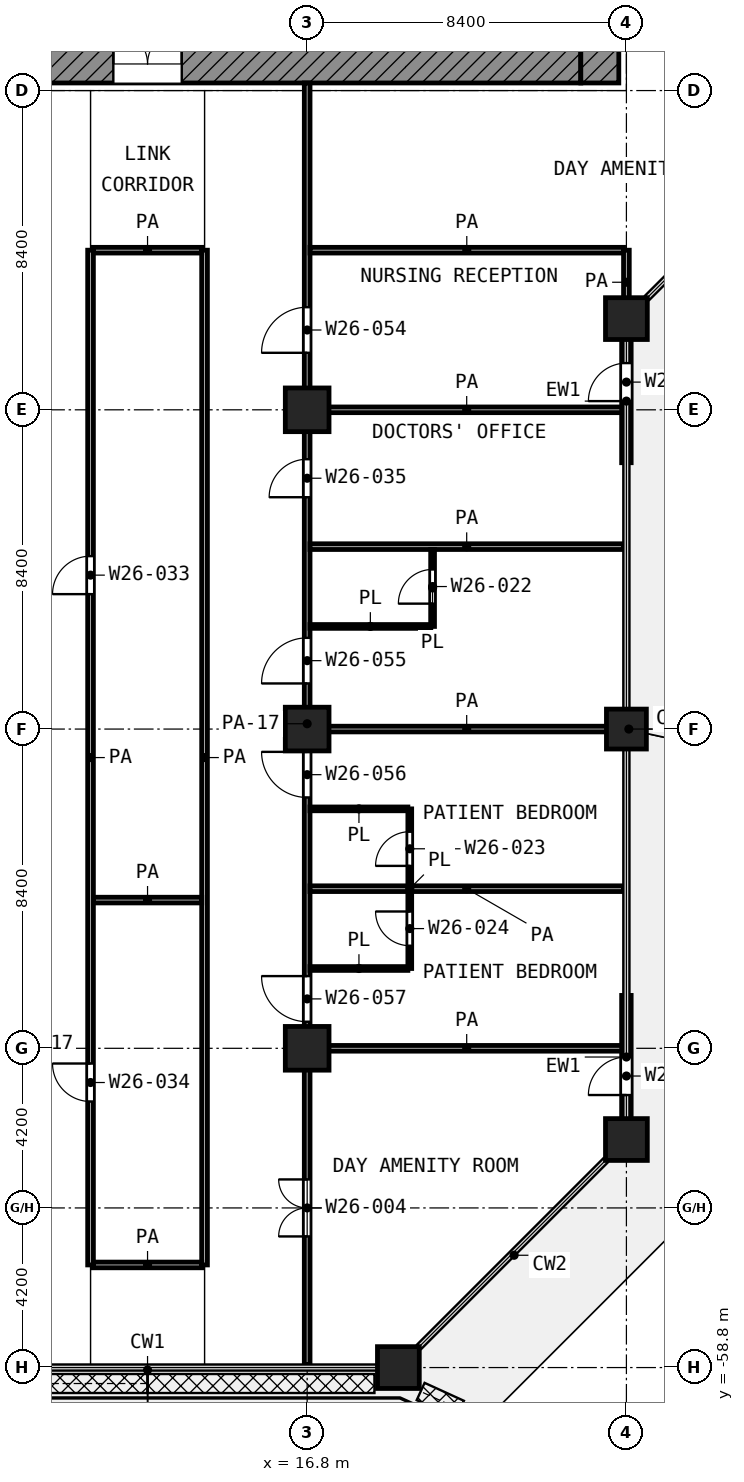
"""IFC4 building model, lengths in metres.
Left out: names, types, materials, properties, quantities, classifications, styles, units other than length and angle.
Written with IfcOpenShell. Run it as: python <this file> out.ifc"""

import sys

from ifc_helpers import new_model, si_unit, direction, frame, frame_2d, origin, origin_2d, place, context, subcontext, project, spatial, rectangle, extrude, element, fill, save


model = new_model("IFC4")
c1 = context("Model", 3, precision=1e-05, world=origin(), true_north=direction((0.0, 1.0)))
c2 = subcontext(c1, "Body", "Model", "MODEL_VIEW")
j1 = project(units=[si_unit("LENGTHUNIT", "METRE"), si_unit("PLANEANGLEUNIT", "RADIAN")], contexts=[c1])
p1 = place(None, origin())
s1 = spatial("IfcSite", under=j1, at=p1, CompositionType="ELEMENT")
p2 = place(p1, origin())
s2 = spatial("IfcBuilding", under=s1, at=p2, CompositionType="ELEMENT")
p3 = place(p2, frame((0.0, 0.0, 115.6)))
s3 = spatial("IfcBuildingStorey", under=s2, at=p3, CompositionType="ELEMENT", Elevation=115.6)
p4 = place(p3, frame((25.2, -31.2, 0.0), z_axis=(0.0, 0.0, 1.0), x_axis=(1.0, 0.0, 0.0)))
e1 = element("IfcColumn", 1, at=p4, inside=s3, PredefinedType="COLUMN", context=c2, shape_type="SweptSolid", body=[
    extrude(rectangle(XDim=1.1, YDim=1.1, at=origin_2d()), origin(), (0.0, 0.0, 1.0), 4.2),
])
for number, where, z_axis, x_axis in (
    (2, (16.8, -33.6, 0.0), (0.0, 0.0, 1.0), (1.0, 0.0, 0.0)),
    (3, (16.8, -42.0, 0.0), (0.0, 0.0, 1.0), (1.0, 0.0, 0.0)),
):
    element("IfcColumn", number, at=place(p3, frame(where, z_axis=z_axis, x_axis=x_axis)), inside=s3, PredefinedType="COLUMN", context=c2, shape_type="SweptSolid", body=[
        extrude(rectangle(XDim=1.15, YDim=1.15, at=origin_2d()), origin(), (0.0, 0.0, 1.0), 4.2),
    ])
p5 = place(p3, frame((25.2, -42.0, 0.0), z_axis=(0.0, 0.0, 1.0), x_axis=(1.0, 0.0, 0.0)))
e4 = element("IfcColumn", 4, at=p5, inside=s3, PredefinedType="COLUMN", context=c2, shape_type="SweptSolid", body=[
    extrude(rectangle(XDim=1.05, YDim=1.05, at=origin_2d()), origin(), (0.0, 0.0, 1.0), 4.2),
])
p6 = place(p3, frame((16.8, -50.4, 0.0), z_axis=(0.0, 0.0, 1.0), x_axis=(1.0, 0.0, 0.0)))
e5 = element("IfcColumn", 5, at=p6, inside=s3, PredefinedType="COLUMN", context=c2, shape_type="SweptSolid", body=[
    extrude(rectangle(XDim=1.15, YDim=1.15, at=origin_2d()), origin(), (0.0, 0.0, 1.0), 4.2),
])
for number, where, z_axis, x_axis in (
    (6, (25.2, -52.8, 0.0), (0.0, 0.0, 1.0), (1.0, 0.0, 0.0)),
    (7, (19.2, -58.8, 0.0), (0.0, 0.0, 1.0), (1.0, 0.0, 0.0)),
):
    element("IfcColumn", number, at=place(p3, frame(where, z_axis=z_axis, x_axis=x_axis)), inside=s3, PredefinedType="COLUMN", context=c2, shape_type="SweptSolid", body=[
        extrude(rectangle(XDim=1.1, YDim=1.1, at=origin_2d()), origin(), (0.0, 0.0, 1.0), 4.2),
    ])
p7 = place(p3, frame((25.2, -52.25, 0.0), z_axis=(0.0, 0.0, 1.0), x_axis=(0.0, 1.0, 0.0)))
e8 = element("IfcWall", 8, at=p7, inside=s3, PredefinedType="SOLIDWALL", context=c2, shape_type="SweptSolid", body=[
    extrude(rectangle(XDim=3.242, YDim=0.25, at=frame_2d((1.621, 0.0))), origin(), (0.0, 0.0, 1.0), 3.48),
])
p8 = place(p7, frame((0.621, 0.0, 0.0)))
e9 = element("IfcOpeningElement", 9, at=p8, cuts=e8, PredefinedType="OPENING", context=c2, shape_type="SweptSolid", body=[
    extrude(rectangle(XDim=1.0, YDim=2.1, at=frame_2d((0.5, 1.05))), frame((0.0, 0.135, 0.0), z_axis=(0.0, -1.0, 0.0), x_axis=(1.0, 0.0, 0.0)), (0.0, 0.0, 1.0), 0.27),
])
p9 = place(p3, frame((25.2, -34.992, 0.0), z_axis=(0.0, 0.0, 1.0), x_axis=(0.0, 1.0, 0.0)))
e10 = element("IfcWall", 10, at=p9, inside=s3, PredefinedType="SOLIDWALL", context=c2, shape_type="SweptSolid", body=[
    extrude(rectangle(XDim=3.242, YDim=0.25, at=frame_2d((1.621, 0.0))), origin(), (0.0, 0.0, 1.0), 3.48),
])
p10 = place(p9, frame((1.621, 0.0, 0.0)))
e11 = element("IfcOpeningElement", 11, at=p10, cuts=e10, PredefinedType="OPENING", context=c2, shape_type="SweptSolid", body=[
    extrude(rectangle(XDim=1.0, YDim=2.1, at=frame_2d((0.5, 1.05))), frame((0.0, 0.135, 0.0), z_axis=(0.0, -1.0, 0.0), x_axis=(1.0, 0.0, 0.0)), (0.0, 0.0, 1.0), 0.27),
])
p11 = place(p3, frame((5.4, -24.5, 0.0), z_axis=(0.0, 0.0, 1.0), x_axis=(1.0, 0.0, 0.0)))
e12 = element("IfcWall", 12, at=p11, inside=s3, PredefinedType="SHEAR", context=c2, shape_type="SweptSolid", body=[
    extrude(rectangle(XDim=18.6, YDim=1.0, at=frame_2d((9.3, 0.0))), origin(), (0.0, 0.0, 1.0), 3.6),
])
p12 = place(p11, frame((6.3, 0.0, 0.0)))
e13 = element("IfcOpeningElement", 13, at=p12, cuts=e12, PredefinedType="OPENING", context=c2, shape_type="SweptSolid", body=[
    extrude(rectangle(XDim=1.8, YDim=2.1, at=frame_2d((0.9, 1.05))), frame((0.0, 0.51, 0.0), z_axis=(0.0, -1.0, 0.0), x_axis=(1.0, 0.0, 0.0)), (0.0, 0.0, 1.0), 1.02),
])
p13 = place(p3, frame((24.5, -25.0, 0.0), z_axis=(0.0, 0.0, 1.0), x_axis=(0.0, 1.0, 0.0)))
e14 = element("IfcWall", 14, at=p13, inside=s3, PredefinedType="SHEAR", context=c2, shape_type="SweptSolid", body=[
    extrude(rectangle(XDim=1.0, YDim=1.0, at=frame_2d((0.5, 0.0))), origin(), (0.0, 0.0, 1.0), 3.6),
])
for number, where, z_axis, x_axis in (
    (15, (16.875, -48.3, 0.0), (0.0, 0.0, 1.0), (1.0, 0.0, 0.0)),
    (16, (16.875, -44.1, 0.0), (0.0, 0.0, 1.0), (1.0, 0.0, 0.0)),
):
    element("IfcWall", number, at=place(p3, frame(where, z_axis=z_axis, x_axis=x_axis)), inside=s3, PredefinedType="PARTITIONING", context=c2, shape_type="SweptSolid", body=[
        extrude(rectangle(XDim=2.575, YDim=0.1, at=frame_2d((1.288, 0.0))), origin(), (0.0, 0.0, 1.0), 3.6),
    ])
p14 = place(p3, frame((16.875, -39.3, 0.0), z_axis=(0.0, 0.0, 1.0), x_axis=(1.0, 0.0, 0.0)))
e17 = element("IfcWall", 17, at=p14, inside=s3, PredefinedType="PARTITIONING", context=c2, shape_type="SweptSolid", body=[
    extrude(rectangle(XDim=3.175, YDim=0.1, at=frame_2d((1.587, 0.0))), origin(), (0.0, 0.0, 1.0), 3.6),
])
p15 = place(p3, frame((19.5, -48.3, 0.0), z_axis=(0.0, 0.0, 1.0), x_axis=(0.0, 1.0, 0.0)))
e18 = element("IfcWall", 18, at=p15, inside=s3, PredefinedType="PARTITIONING", context=c2, shape_type="SweptSolid", body=[
    extrude(rectangle(XDim=4.2, YDim=0.1, at=frame_2d((2.1, 0.0))), origin(), (0.0, 0.0, 1.0), 3.6),
])
p16 = place(p15, frame((2.7, 0.0, 0.0)))
e19 = element("IfcOpeningElement", 19, at=p16, cuts=e18, PredefinedType="OPENING", context=c2, shape_type="SweptSolid", body=[
    extrude(rectangle(XDim=0.9, YDim=2.1, at=frame_2d((0.45, 1.05))), frame((0.0, 0.06, 0.0), z_axis=(0.0, -1.0, 0.0), x_axis=(1.0, 0.0, 0.0)), (0.0, 0.0, 1.0), 0.12),
])
p17 = place(p15, frame((0.6, 0.0, 0.0)))
e20 = element("IfcOpeningElement", 20, at=p17, cuts=e18, PredefinedType="OPENING", context=c2, shape_type="SweptSolid", body=[
    extrude(rectangle(XDim=0.9, YDim=2.1, at=frame_2d((0.45, 1.05))), frame((0.0, 0.06, 0.0), z_axis=(0.0, -1.0, 0.0), x_axis=(1.0, 0.0, 0.0)), (0.0, 0.0, 1.0), 0.12),
])
p18 = place(p3, frame((20.1, -39.3, 0.0), z_axis=(0.0, 0.0, 1.0), x_axis=(0.0, 1.0, 0.0)))
e21 = element("IfcWall", 21, at=p18, inside=s3, PredefinedType="PARTITIONING", context=c2, shape_type="SweptSolid", body=[
    extrude(rectangle(XDim=2.025, YDim=0.1, at=frame_2d((1.013, 0.0))), origin(), (0.0, 0.0, 1.0), 3.6),
])
p19 = place(p18, frame((0.6, 0.0, 0.0)))
e22 = element("IfcOpeningElement", 22, at=p19, cuts=e21, PredefinedType="OPENING", context=c2, shape_type="SweptSolid", body=[
    extrude(rectangle(XDim=0.9, YDim=2.1, at=frame_2d((0.45, 1.05))), frame((0.0, 0.06, 0.0), z_axis=(0.0, -1.0, 0.0), x_axis=(1.0, 0.0, 0.0)), (0.0, 0.0, 1.0), 0.12),
])
p20 = place(p3, frame((11.175, -56.1, 0.0), z_axis=(0.0, 0.0, 1.0), x_axis=(1.0, 0.0, 0.0)))
e23 = element("IfcWall", 23, at=p20, inside=s3, PredefinedType="PARTITIONING", context=c2, shape_type="SweptSolid", body=[
    extrude(rectangle(XDim=2.85, YDim=0.15, at=frame_2d((1.425, 0.0))), origin(), (0.0, 0.0, 1.0), 3.6),
])
p21 = place(p3, frame((16.875, -50.4, 0.0), z_axis=(0.0, 0.0, 1.0), x_axis=(1.0, 0.0, 0.0)))
e24 = element("IfcWall", 24, at=p21, inside=s3, PredefinedType="PARTITIONING", context=c2, shape_type="SweptSolid", body=[
    extrude(rectangle(XDim=8.245, YDim=0.15, at=frame_2d((4.123, 0.0))), origin(), (0.0, 0.0, 1.0), 3.6),
])
p22 = place(p3, frame((11.175, -46.5, 0.0), z_axis=(0.0, 0.0, 1.0), x_axis=(1.0, 0.0, 0.0)))
e25 = element("IfcWall", 25, at=p22, inside=s3, PredefinedType="PARTITIONING", context=c2, shape_type="SweptSolid", body=[
    extrude(rectangle(XDim=2.85, YDim=0.15, at=frame_2d((1.425, 0.0))), origin(), (0.0, 0.0, 1.0), 3.6),
])
for number, where, z_axis, x_axis in (
    (26, (16.875, -46.2, 0.0), (0.0, 0.0, 1.0), (1.0, 0.0, 0.0)),
    (27, (16.875, -42.0, 0.0), (0.0, 0.0, 1.0), (1.0, 0.0, 0.0)),
    (28, (16.875, -37.2, 0.0), (0.0, 0.0, 1.0), (1.0, 0.0, 0.0)),
    (29, (16.875, -33.6, 0.0), (0.0, 0.0, 1.0), (1.0, 0.0, 0.0)),
):
    element("IfcWall", number, at=place(p3, frame(where, z_axis=z_axis, x_axis=x_axis)), inside=s3, PredefinedType="PARTITIONING", context=c2, shape_type="SweptSolid", body=[
        extrude(rectangle(XDim=8.245, YDim=0.15, at=frame_2d((4.123, 0.0))), origin(), (0.0, 0.0, 1.0), 3.6),
    ])
p23 = place(p3, frame((11.175, -29.4, 0.0), z_axis=(0.0, 0.0, 1.0), x_axis=(1.0, 0.0, 0.0)))
e30 = element("IfcWall", 30, at=p23, inside=s3, PredefinedType="PARTITIONING", context=c2, shape_type="SweptSolid", body=[
    extrude(rectangle(XDim=2.85, YDim=0.15, at=frame_2d((1.425, 0.0))), origin(), (0.0, 0.0, 1.0), 3.6),
])
p24 = place(p3, frame((16.875, -29.4, 0.0), z_axis=(0.0, 0.0, 1.0), x_axis=(1.0, 0.0, 0.0)))
e31 = element("IfcWall", 31, at=p24, inside=s3, PredefinedType="PARTITIONING", context=c2, shape_type="SweptSolid", body=[
    extrude(rectangle(XDim=8.25, YDim=0.15, at=frame_2d((4.125, 0.0))), origin(), (0.0, 0.0, 1.0), 3.6),
])
p25 = place(p3, frame((11.1, -56.1, 0.0), z_axis=(0.0, 0.0, 1.0), x_axis=(0.0, 1.0, 0.0)))
e32 = element("IfcWall", 32, at=p25, inside=s3, PredefinedType="PARTITIONING", context=c2, shape_type="SweptSolid", body=[
    extrude(rectangle(XDim=26.7, YDim=0.15, at=frame_2d((13.35, 0.0))), origin(), (0.0, 0.0, 1.0), 3.6),
])
p26 = place(p25, frame((17.65, 0.0, 0.0)))
e33 = element("IfcOpeningElement", 33, at=p26, cuts=e32, PredefinedType="OPENING", context=c2, shape_type="SweptSolid", body=[
    extrude(rectangle(XDim=1.0, YDim=2.1, at=frame_2d((0.5, 1.05))), frame((0.0, 0.085, 0.0), z_axis=(0.0, -1.0, 0.0), x_axis=(1.0, 0.0, 0.0)), (0.0, 0.0, 1.0), 0.17),
])
p27 = place(p25, frame((4.3, 0.0, 0.0)))
e34 = element("IfcOpeningElement", 34, at=p27, cuts=e32, PredefinedType="OPENING", context=c2, shape_type="SweptSolid", body=[
    extrude(rectangle(XDim=1.0, YDim=2.1, at=frame_2d((0.5, 1.05))), frame((0.0, 0.085, 0.0), z_axis=(0.0, -1.0, 0.0), x_axis=(1.0, 0.0, 0.0)), (0.0, 0.0, 1.0), 0.17),
])
p28 = place(p3, frame((14.1, -56.1, 0.0), z_axis=(0.0, 0.0, 1.0), x_axis=(0.0, 1.0, 0.0)))
e35 = element("IfcWall", 35, at=p28, inside=s3, PredefinedType="PARTITIONING", context=c2, shape_type="SweptSolid", body=[
    extrude(rectangle(XDim=26.7, YDim=0.15, at=frame_2d((13.35, 0.0))), origin(), (0.0, 0.0, 1.0), 3.6),
])
p29 = place(p3, frame((16.8, -58.72, 0.0), z_axis=(0.0, 0.0, 1.0), x_axis=(0.0, 1.0, 0.0)))
e36 = element("IfcWall", 36, at=p29, inside=s3, PredefinedType="PARTITIONING", context=c2, shape_type="SweptSolid", body=[
    extrude(rectangle(XDim=33.72, YDim=0.15, at=frame_2d((16.86, 0.0))), origin(), (0.0, 0.0, 1.0), 2.7),
])
p30 = place(p29, frame((26.62, 0.0, 0.0)))
e37 = element("IfcOpeningElement", 37, at=p30, cuts=e36, PredefinedType="OPENING", context=c2, shape_type="SweptSolid", body=[
    extrude(rectangle(XDim=1.2, YDim=2.1, at=frame_2d((0.6, 1.05))), frame((0.0, 0.085, 0.0), z_axis=(0.0, -1.0, 0.0), x_axis=(1.0, 0.0, 0.0)), (0.0, 0.0, 1.0), 0.17),
])
p31 = place(p29, frame((22.82, 0.0, 0.0)))
e38 = element("IfcOpeningElement", 38, at=p31, cuts=e36, PredefinedType="OPENING", context=c2, shape_type="SweptSolid", body=[
    extrude(rectangle(XDim=1.0, YDim=2.1, at=frame_2d((0.5, 1.05))), frame((0.0, 0.085, 0.0), z_axis=(0.0, -1.0, 0.0), x_axis=(1.0, 0.0, 0.0)), (0.0, 0.0, 1.0), 0.17),
])
p32 = place(p29, frame((17.92, 0.0, 0.0)))
e39 = element("IfcOpeningElement", 39, at=p32, cuts=e36, PredefinedType="OPENING", context=c2, shape_type="SweptSolid", body=[
    extrude(rectangle(XDim=1.2, YDim=2.1, at=frame_2d((0.6, 1.05))), frame((0.0, 0.085, 0.0), z_axis=(0.0, -1.0, 0.0), x_axis=(1.0, 0.0, 0.0)), (0.0, 0.0, 1.0), 0.17),
])
p33 = place(p29, frame((14.92, 0.0, 0.0)))
e40 = element("IfcOpeningElement", 40, at=p33, cuts=e36, PredefinedType="OPENING", context=c2, shape_type="SweptSolid", body=[
    extrude(rectangle(XDim=1.2, YDim=2.1, at=frame_2d((0.6, 1.05))), frame((0.0, 0.085, 0.0), z_axis=(0.0, -1.0, 0.0), x_axis=(1.0, 0.0, 0.0)), (0.0, 0.0, 1.0), 0.17),
])
p34 = place(p29, frame((9.02, 0.0, 0.0)))
e41 = element("IfcOpeningElement", 41, at=p34, cuts=e36, PredefinedType="OPENING", context=c2, shape_type="SweptSolid", body=[
    extrude(rectangle(XDim=1.2, YDim=2.1, at=frame_2d((0.6, 1.05))), frame((0.0, 0.085, 0.0), z_axis=(0.0, -1.0, 0.0), x_axis=(1.0, 0.0, 0.0)), (0.0, 0.0, 1.0), 0.17),
])
p35 = place(p29, frame((3.37, 0.0, 0.0)))
e42 = element("IfcOpeningElement", 42, at=p35, cuts=e36, PredefinedType="OPENING", context=c2, shape_type="SweptSolid", body=[
    extrude(rectangle(XDim=1.5, YDim=2.1, at=frame_2d((0.75, 1.05))), frame((0.0, 0.085, 0.0), z_axis=(0.0, -1.0, 0.0), x_axis=(1.0, 0.0, 0.0)), (0.0, 0.0, 1.0), 0.17),
])
p36 = place(p3, frame((25.2, -31.087, 0.0), z_axis=(0.0, 0.0, 1.0), x_axis=(0.0, 1.0, 0.0)))
e43 = element("IfcWall", 43, at=p36, inside=s3, PredefinedType="PARTITIONING", context=c2, shape_type="SweptSolid", body=[
    extrude(rectangle(XDim=1.687, YDim=0.15, at=frame_2d((0.844, 0.0))), origin(), (0.0, 0.0, 1.0), 3.6),
])
p37 = place(p8, origin())
e44 = element("IfcDoor", 44, at=p37, inside=s3, OperationType="SINGLE_SWING_LEFT", PredefinedType="DOOR", context=c2, shape_type="SweptSolid", body=[
    extrude(rectangle(XDim=1.0, YDim=2.1, at=frame_2d((0.5, 1.05))), frame((0.0, 0.025, 0.0), z_axis=(0.0, -1.0, 0.0), x_axis=(1.0, 0.0, 0.0)), (0.0, 0.0, 1.0), 0.05),
])
fill(e9, e44)
p38 = place(p10, origin())
e45 = element("IfcDoor", 45, at=p38, inside=s3, OperationType="SINGLE_SWING_LEFT", PredefinedType="DOOR", context=c2, shape_type="SweptSolid", body=[
    extrude(rectangle(XDim=1.0, YDim=2.1, at=frame_2d((0.5, 1.05))), frame((0.0, 0.025, 0.0), z_axis=(0.0, -1.0, 0.0), x_axis=(1.0, 0.0, 0.0)), (0.0, 0.0, 1.0), 0.05),
])
fill(e11, e45)
p39 = place(p12, origin())
e46 = element("IfcDoor", 46, at=p39, inside=s3, OperationType="DOUBLE_DOOR_SINGLE_SWING", PredefinedType="DOOR", context=c2, shape_type="SweptSolid", body=[
    extrude(rectangle(XDim=1.8, YDim=2.1, at=frame_2d((0.9, 1.05))), frame((0.0, 0.025, 0.0), z_axis=(0.0, -1.0, 0.0), x_axis=(1.0, 0.0, 0.0)), (0.0, 0.0, 1.0), 0.05),
])
fill(e13, e46)
p40 = place(p26, origin())
e47 = element("IfcDoor", 47, at=p40, inside=s3, OperationType="SINGLE_SWING_LEFT", PredefinedType="DOOR", context=c2, shape_type="SweptSolid", body=[
    extrude(rectangle(XDim=1.0, YDim=2.1, at=frame_2d((0.5, 1.05))), frame((0.0, 0.025, 0.0), z_axis=(0.0, -1.0, 0.0), x_axis=(1.0, 0.0, 0.0)), (0.0, 0.0, 1.0), 0.05),
])
fill(e33, e47)
p41 = place(p27, origin())
e48 = element("IfcDoor", 48, at=p41, inside=s3, OperationType="SINGLE_SWING_RIGHT", PredefinedType="DOOR", context=c2, shape_type="SweptSolid", body=[
    extrude(rectangle(XDim=1.0, YDim=2.1, at=frame_2d((0.5, 1.05))), frame((0.0, 0.025, 0.0), z_axis=(0.0, -1.0, 0.0), x_axis=(1.0, 0.0, 0.0)), (0.0, 0.0, 1.0), 0.05),
])
fill(e34, e48)
p42 = place(p30, origin())
e49 = element("IfcDoor", 49, at=p42, inside=s3, OperationType="SINGLE_SWING_LEFT", PredefinedType="DOOR", context=c2, shape_type="SweptSolid", body=[
    extrude(rectangle(XDim=1.2, YDim=2.1, at=frame_2d((0.6, 1.05))), frame((0.0, 0.025, 0.0), z_axis=(0.0, -1.0, 0.0), x_axis=(1.0, 0.0, 0.0)), (0.0, 0.0, 1.0), 0.05),
])
fill(e37, e49)
p43 = place(p31, origin())
e50 = element("IfcDoor", 50, at=p43, inside=s3, OperationType="SINGLE_SWING_LEFT", PredefinedType="DOOR", context=c2, shape_type="SweptSolid", body=[
    extrude(rectangle(XDim=1.0, YDim=2.1, at=frame_2d((0.5, 1.05))), frame((0.0, 0.025, 0.0), z_axis=(0.0, -1.0, 0.0), x_axis=(1.0, 0.0, 0.0)), (0.0, 0.0, 1.0), 0.05),
])
fill(e38, e50)
p44 = place(p32, origin())
e51 = element("IfcDoor", 51, at=p44, inside=s3, OperationType="SINGLE_SWING_LEFT", PredefinedType="DOOR", context=c2, shape_type="SweptSolid", body=[
    extrude(rectangle(XDim=1.2, YDim=2.1, at=frame_2d((0.6, 1.05))), frame((0.0, 0.025, 0.0), z_axis=(0.0, -1.0, 0.0), x_axis=(1.0, 0.0, 0.0)), (0.0, 0.0, 1.0), 0.05),
])
fill(e39, e51)
p45 = place(p19, origin())
e52 = element("IfcDoor", 52, at=p45, inside=s3, OperationType="SINGLE_SWING_LEFT", PredefinedType="DOOR", context=c2, shape_type="SweptSolid", body=[
    extrude(rectangle(XDim=0.9, YDim=2.1, at=frame_2d((0.45, 1.05))), frame((0.0, 0.025, 0.0), z_axis=(0.0, -1.0, 0.0), x_axis=(1.0, 0.0, 0.0)), (0.0, 0.0, 1.0), 0.05),
])
fill(e22, e52)
p46 = place(p33, origin())
e53 = element("IfcDoor", 53, at=p46, inside=s3, OperationType="SINGLE_SWING_RIGHT", PredefinedType="DOOR", context=c2, shape_type="SweptSolid", body=[
    extrude(rectangle(XDim=1.2, YDim=2.1, at=frame_2d((0.6, 1.05))), frame((0.0, 0.025, 0.0), z_axis=(0.0, -1.0, 0.0), x_axis=(1.0, 0.0, 0.0)), (0.0, 0.0, 1.0), 0.05),
])
fill(e40, e53)
p47 = place(p16, origin())
e54 = element("IfcDoor", 54, at=p47, inside=s3, OperationType="SINGLE_SWING_LEFT", PredefinedType="DOOR", context=c2, shape_type="SweptSolid", body=[
    extrude(rectangle(XDim=0.9, YDim=2.1, at=frame_2d((0.45, 1.05))), frame((0.0, 0.025, 0.0), z_axis=(0.0, -1.0, 0.0), x_axis=(1.0, 0.0, 0.0)), (0.0, 0.0, 1.0), 0.05),
])
fill(e19, e54)
p48 = place(p34, origin())
e55 = element("IfcDoor", 55, at=p48, inside=s3, OperationType="SINGLE_SWING_RIGHT", PredefinedType="DOOR", context=c2, shape_type="SweptSolid", body=[
    extrude(rectangle(XDim=1.2, YDim=2.1, at=frame_2d((0.6, 1.05))), frame((0.0, 0.025, 0.0), z_axis=(0.0, -1.0, 0.0), x_axis=(1.0, 0.0, 0.0)), (0.0, 0.0, 1.0), 0.05),
])
fill(e41, e55)
p49 = place(p17, origin())
e56 = element("IfcDoor", 56, at=p49, inside=s3, OperationType="SINGLE_SWING_RIGHT", PredefinedType="DOOR", context=c2, shape_type="SweptSolid", body=[
    extrude(rectangle(XDim=0.9, YDim=2.1, at=frame_2d((0.45, 1.05))), frame((0.0, 0.025, 0.0), z_axis=(0.0, -1.0, 0.0), x_axis=(1.0, 0.0, 0.0)), (0.0, 0.0, 1.0), 0.05),
])
fill(e20, e56)
p50 = place(p35, origin())
e57 = element("IfcDoor", 57, at=p50, inside=s3, OperationType="DOUBLE_DOOR_SINGLE_SWING", PredefinedType="DOOR", context=c2, shape_type="SweptSolid", body=[
    extrude(rectangle(XDim=1.5, YDim=2.1, at=frame_2d((0.75, 1.05))), frame((0.0, 0.025, 0.0), z_axis=(0.0, -1.0, 0.0), x_axis=(1.0, 0.0, 0.0)), (0.0, 0.0, 1.0), 0.05),
])
fill(e42, e57)
save(model, sys.argv[1])
